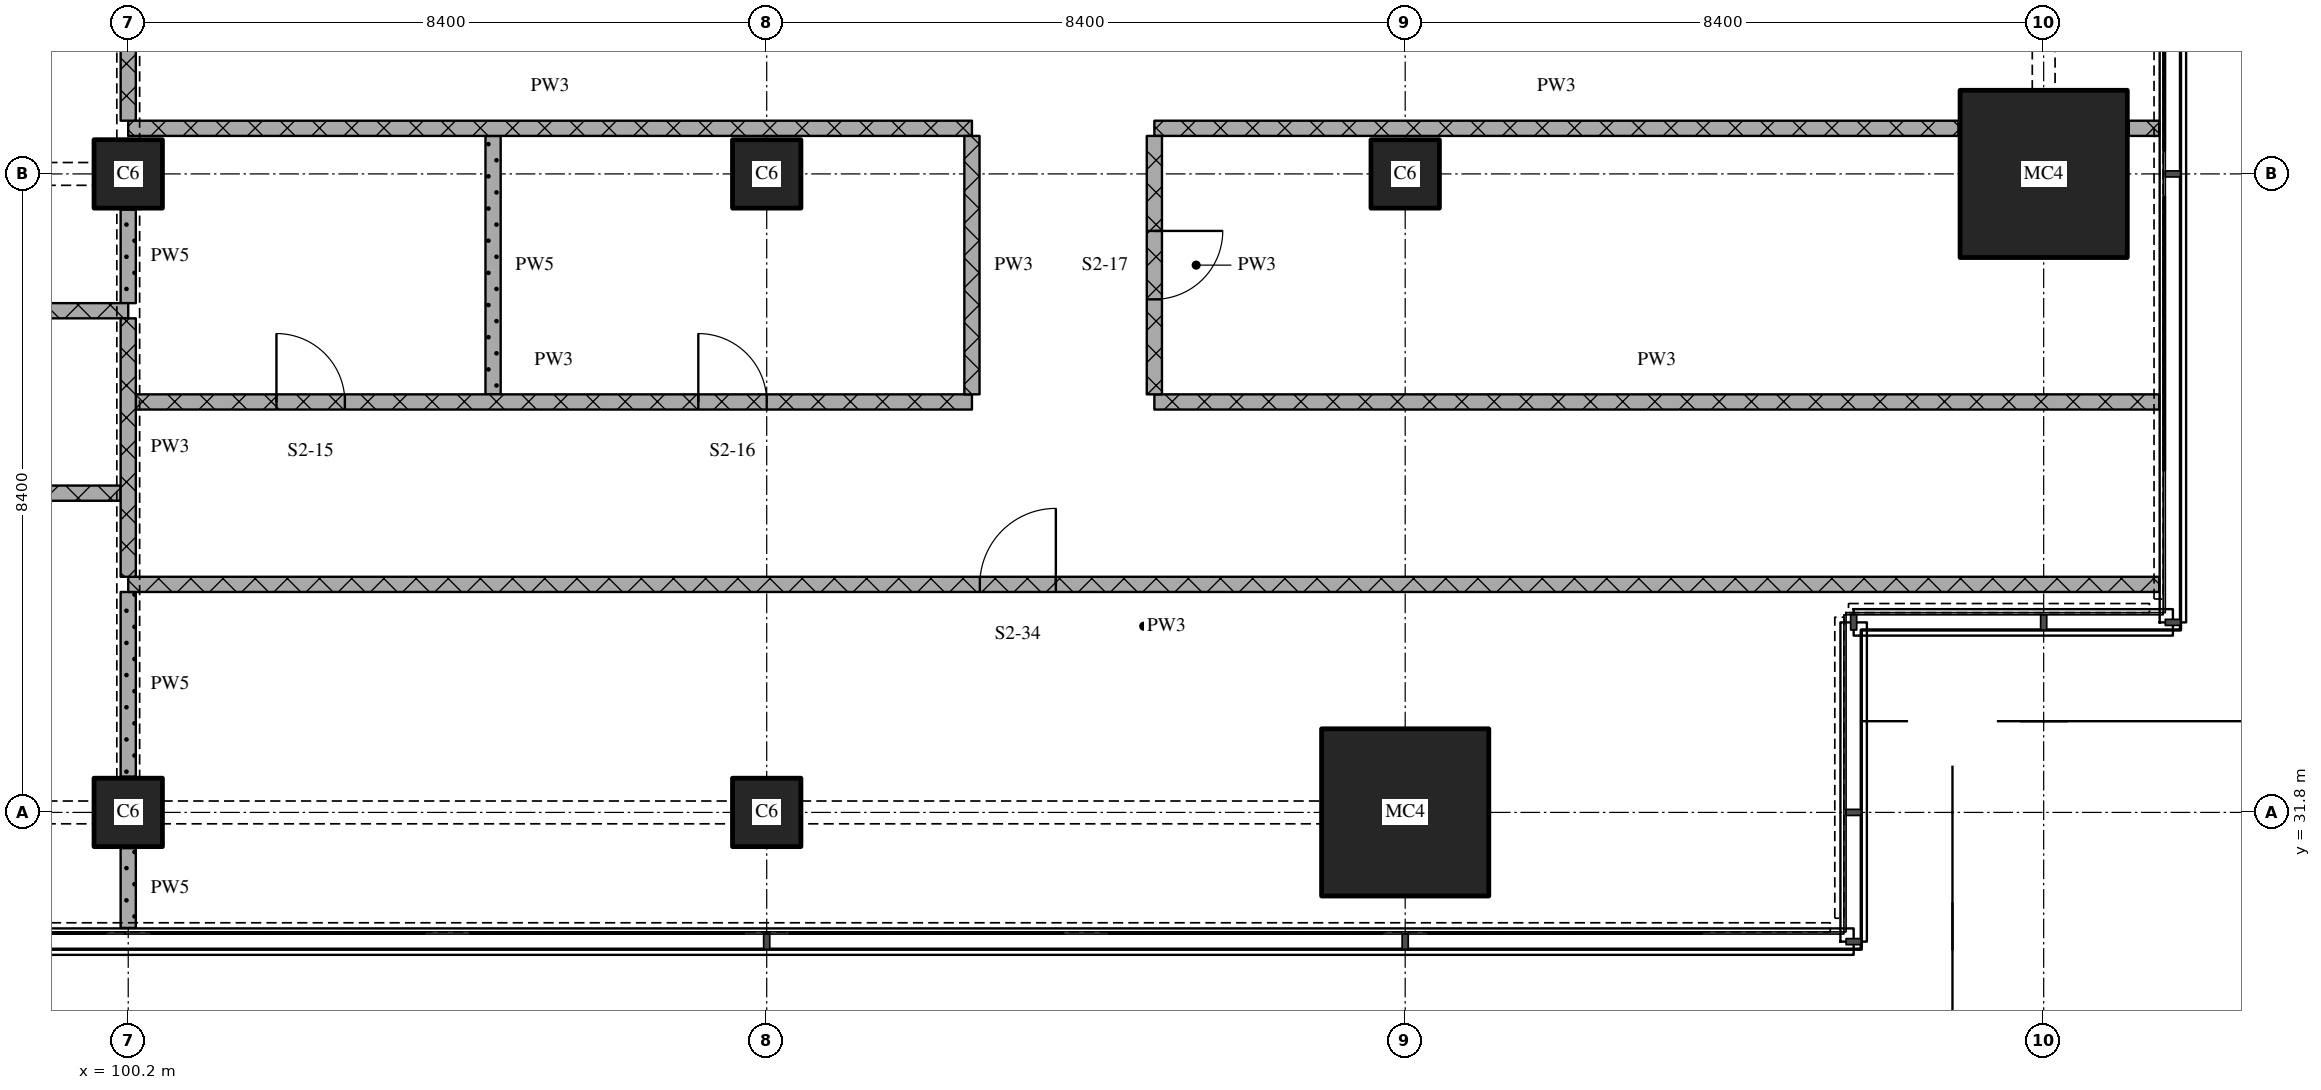
"""IFC4 building model, lengths in metres.
Left out: names, types, materials, properties, quantities, classifications, styles, units other than length and angle.
Written with IfcOpenShell. Run it as: python <this file> out.ifc"""

import sys

from ifc_helpers import new_model, si_unit, direction, frame, frame_2d, origin, origin_2d, place, context, subcontext, project, spatial, rectangle, extrude, element, fill, save


model = new_model("IFC4")
c1 = context("Model", 3, precision=1e-05, world=origin(), true_north=direction((0.0, 1.0)))
c2 = subcontext(c1, "Body", "Model", "MODEL_VIEW")
j1 = project(units=[si_unit("LENGTHUNIT", "METRE"), si_unit("PLANEANGLEUNIT", "RADIAN")], contexts=[c1])
p1 = place(None, origin())
s1 = spatial("IfcSite", under=j1, at=p1, CompositionType="ELEMENT")
p2 = place(p1, origin())
s2 = spatial("IfcBuilding", under=s1, at=p2, CompositionType="ELEMENT")
p3 = place(p2, frame((0.0, 0.0, 23.7)))
s3 = spatial("IfcBuildingStorey", under=s2, at=p3, CompositionType="ELEMENT", Elevation=23.7)
for number, where, z_axis, x_axis in (
    (1, (100.2, 31.8, 0.0), (0.0, 0.0, 1.0), (1.0, 0.0, 0.0)),
    (2, (100.2, 40.2, 0.0), (0.0, 0.0, 1.0), (1.0, 0.0, 0.0)),
    (3, (108.6, 31.8, 0.0), (0.0, 0.0, 1.0), (1.0, 0.0, 0.0)),
    (4, (108.6, 40.2, 0.0), (0.0, 0.0, 1.0), (1.0, 0.0, 0.0)),
):
    element("IfcColumn", number, at=place(p3, frame(where, z_axis=z_axis, x_axis=x_axis)), inside=s3, PredefinedType="COLUMN", context=c2, shape_type="SweptSolid", body=[
        extrude(rectangle(XDim=0.9, YDim=0.9, at=origin_2d()), origin(), (0.0, 0.0, 1.0), 4.5),
    ])
p4 = place(p3, frame((117.0, 31.8, 0.0), z_axis=(0.0, 0.0, 1.0), x_axis=(1.0, 0.0, 0.0)))
e5 = element("IfcColumn", 5, at=p4, inside=s3, PredefinedType="COLUMN", context=c2, shape_type="SweptSolid", body=[
    extrude(rectangle(XDim=2.2, YDim=2.2, at=origin_2d()), origin(), (0.0, 0.0, 1.0), 4.5),
])
p5 = place(p3, frame((117.0, 40.2, 0.0), z_axis=(0.0, 0.0, 1.0), x_axis=(1.0, 0.0, 0.0)))
e6 = element("IfcColumn", 6, at=p5, inside=s3, PredefinedType="COLUMN", context=c2, shape_type="SweptSolid", body=[
    extrude(rectangle(XDim=0.9, YDim=0.9, at=origin_2d()), origin(), (0.0, 0.0, 1.0), 4.5),
])
p6 = place(p3, frame((125.4, 40.2, 0.0), z_axis=(0.0, 0.0, 1.0), x_axis=(1.0, 0.0, 0.0)))
e7 = element("IfcColumn", 7, at=p6, inside=s3, PredefinedType="COLUMN", context=c2, shape_type="SweptSolid", body=[
    extrude(rectangle(XDim=2.2, YDim=2.2, at=origin_2d()), origin(), (0.0, 0.0, 1.0), 4.5),
])
p7 = place(p3, frame((126.92, 34.8, 0.0), z_axis=(0.0, 0.0, 1.0), x_axis=(-1.0, 0.0, 0.0)))
e8 = element("IfcWall", 8, at=p7, inside=s3, PredefinedType="PARTITIONING", context=c2, shape_type="SweptSolid", body=[
    extrude(rectangle(XDim=26.72, YDim=0.2, at=frame_2d((13.36, 0.0))), origin(), (0.0, 0.0, 1.0), 4.2),
])
p8 = place(p7, frame((14.516, 0.0, 0.0)))
e9 = element("IfcOpeningElement", 9, at=p8, cuts=e8, PredefinedType="OPENING", context=c2, shape_type="SweptSolid", body=[
    extrude(rectangle(XDim=1.0, YDim=2.1, at=frame_2d((0.5, 1.05))), frame((0.0, 0.11, 0.0), z_axis=(0.0, -1.0, 0.0), x_axis=(1.0, 0.0, 0.0)), (0.0, 0.0, 1.0), 0.22),
])
p9 = place(p3, frame((100.1, 36.0, 0.0), z_axis=(0.0, 0.0, 1.0), x_axis=(-1.0, 0.0, 0.0)))
e10 = element("IfcWall", 10, at=p9, inside=s3, PredefinedType="PARTITIONING", context=c2, shape_type="SweptSolid", body=[
    extrude(rectangle(XDim=25.0, YDim=0.2, at=frame_2d((12.5, 0.0))), origin(), (0.0, 0.0, 1.0), 4.2),
])
p10 = place(p9, frame((12.0, 0.0, 0.0)))
e11 = element("IfcOpeningElement", 11, at=p10, cuts=e10, PredefinedType="OPENING", context=c2, shape_type="SweptSolid", body=[
    extrude(rectangle(XDim=1.0, YDim=2.1, at=frame_2d((0.5, 1.05))), frame((0.0, 0.11, 0.0), z_axis=(0.0, -1.0, 0.0), x_axis=(1.0, 0.0, 0.0)), (0.0, 0.0, 1.0), 0.22),
])
p11 = place(p3, frame((100.3, 37.2, 0.0), z_axis=(0.0, 0.0, 1.0), x_axis=(1.0, 0.0, 0.0)))
e12 = element("IfcWall", 12, at=p11, inside=s3, PredefinedType="PARTITIONING", context=c2, shape_type="SweptSolid", body=[
    extrude(rectangle(XDim=11.0, YDim=0.2, at=frame_2d((5.5, 0.0))), origin(), (0.0, 0.0, 1.0), 4.2),
])
p12 = place(p11, frame((1.85, 0.0, 0.0)))
e13 = element("IfcOpeningElement", 13, at=p12, cuts=e12, PredefinedType="OPENING", context=c2, shape_type="SweptSolid", body=[
    extrude(rectangle(XDim=0.9, YDim=2.1, at=frame_2d((0.45, 1.05))), frame((0.0, 0.11, 0.0), z_axis=(0.0, -1.0, 0.0), x_axis=(1.0, 0.0, 0.0)), (0.0, 0.0, 1.0), 0.22),
])
p13 = place(p11, frame((7.4, 0.0, 0.0)))
e14 = element("IfcOpeningElement", 14, at=p13, cuts=e12, PredefinedType="OPENING", context=c2, shape_type="SweptSolid", body=[
    extrude(rectangle(XDim=0.9, YDim=2.1, at=frame_2d((0.45, 1.05))), frame((0.0, 0.11, 0.0), z_axis=(0.0, -1.0, 0.0), x_axis=(1.0, 0.0, 0.0)), (0.0, 0.0, 1.0), 0.22),
])
p14 = place(p3, frame((113.7, 37.2, 0.0), z_axis=(0.0, 0.0, 1.0), x_axis=(1.0, 0.0, 0.0)))
e15 = element("IfcWall", 15, at=p14, inside=s3, PredefinedType="PARTITIONING", context=c2, shape_type="SweptSolid", body=[
    extrude(rectangle(XDim=13.22, YDim=0.2, at=frame_2d((6.61, 0.0))), origin(), (0.0, 0.0, 1.0), 4.2),
])
p15 = place(p3, frame((88.8, 38.4, 0.0), z_axis=(0.0, 0.0, 1.0), x_axis=(1.0, 0.0, 0.0)))
e16 = element("IfcWall", 16, at=p15, inside=s3, PredefinedType="PARTITIONING", context=c2, shape_type="SweptSolid", body=[
    extrude(rectangle(XDim=11.4, YDim=0.2, at=frame_2d((5.7, 0.0))), origin(), (0.0, 0.0, 1.0), 4.2),
])
p16 = place(p15, frame((4.95, 0.0, 0.0)))
e17 = element("IfcOpeningElement", 17, at=p16, cuts=e16, PredefinedType="OPENING", context=c2, shape_type="SweptSolid", body=[
    extrude(rectangle(XDim=0.9, YDim=2.1, at=frame_2d((0.45, 1.05))), frame((0.0, 0.11, 0.0), z_axis=(0.0, -1.0, 0.0), x_axis=(1.0, 0.0, 0.0)), (0.0, 0.0, 1.0), 0.22),
])
p17 = place(p15, frame((9.15, 0.0, 0.0)))
e18 = element("IfcOpeningElement", 18, at=p17, cuts=e16, PredefinedType="OPENING", context=c2, shape_type="SweptSolid", body=[
    extrude(rectangle(XDim=0.9, YDim=2.1, at=frame_2d((0.45, 1.05))), frame((0.0, 0.11, 0.0), z_axis=(0.0, -1.0, 0.0), x_axis=(1.0, 0.0, 0.0)), (0.0, 0.0, 1.0), 0.22),
])
p18 = place(p3, frame((100.2, 40.8, 0.0), z_axis=(0.0, 0.0, 1.0), x_axis=(1.0, 0.0, 0.0)))
e19 = element("IfcWall", 19, at=p18, inside=s3, PredefinedType="PARTITIONING", context=c2, shape_type="SweptSolid", body=[
    extrude(rectangle(XDim=11.1, YDim=0.2, at=frame_2d((5.55, 0.0))), origin(), (0.0, 0.0, 1.0), 4.2),
])
p19 = place(p3, frame((113.7, 40.8, 0.0), z_axis=(0.0, 0.0, 1.0), x_axis=(1.0, 0.0, 0.0)))
e20 = element("IfcWall", 20, at=p19, inside=s3, PredefinedType="PARTITIONING", context=c2, shape_type="SweptSolid", body=[
    extrude(rectangle(XDim=10.58, YDim=0.2, at=frame_2d((5.29, 0.0))), origin(), (0.0, 0.0, 1.0), 4.2),
])
p20 = place(p3, frame((126.52, 40.8, 0.0), z_axis=(0.0, 0.0, 1.0), x_axis=(1.0, 0.0, 0.0)))
e21 = element("IfcWall", 21, at=p20, inside=s3, PredefinedType="PARTITIONING", context=c2, shape_type="SweptSolid", body=[
    extrude(rectangle(XDim=0.4, YDim=0.2, at=frame_2d((0.2, 0.0))), origin(), (0.0, 0.0, 1.0), 4.2),
])
p21 = place(p3, frame((100.2, 38.3, 0.0), z_axis=(0.0, 0.0, 1.0), x_axis=(0.0, -1.0, 0.0)))
e22 = element("IfcWall", 22, at=p21, inside=s3, PredefinedType="PARTITIONING", context=c2, shape_type="SweptSolid", body=[
    extrude(rectangle(XDim=3.4, YDim=0.2, at=frame_2d((1.7, 0.0))), origin(), (0.0, 0.0, 1.0), 3.7),
])
p22 = place(p3, frame((100.2, 43.1, 0.0), z_axis=(0.0, 0.0, 1.0), x_axis=(0.0, -1.0, 0.0)))
e23 = element("IfcWall", 23, at=p22, inside=s3, PredefinedType="PARTITIONING", context=c2, shape_type="SweptSolid", body=[
    extrude(rectangle(XDim=2.2, YDim=0.2, at=frame_2d((1.1, 0.0))), origin(), (0.0, 0.0, 1.0), 3.3),
])
p23 = place(p3, frame((100.2, 31.33, 0.0), z_axis=(0.0, 0.0, 1.0), x_axis=(0.0, -1.0, 0.0)))
e24 = element("IfcWall", 24, at=p23, inside=s3, PredefinedType="PARTITIONING", context=c2, shape_type="SweptSolid", body=[
    extrude(rectangle(XDim=1.05, YDim=0.2, at=frame_2d((0.525, 0.0))), origin(), (0.0, 0.0, 1.0), 4.2),
])
p24 = place(p3, frame((100.2, 34.7, 0.0), z_axis=(0.0, 0.0, 1.0), x_axis=(0.0, -1.0, 0.0)))
e25 = element("IfcWall", 25, at=p24, inside=s3, PredefinedType="PARTITIONING", context=c2, shape_type="SweptSolid", body=[
    extrude(rectangle(XDim=2.43, YDim=0.2, at=frame_2d((1.215, 0.0))), origin(), (0.0, 0.0, 1.0), 3.7),
])
p25 = place(p3, frame((100.2, 39.73, 0.0), z_axis=(0.0, 0.0, 1.0), x_axis=(0.0, -1.0, 0.0)))
e26 = element("IfcWall", 26, at=p25, inside=s3, PredefinedType="PARTITIONING", context=c2, shape_type="SweptSolid", body=[
    extrude(rectangle(XDim=1.23, YDim=0.2, at=frame_2d((0.615, 0.0))), origin(), (0.0, 0.0, 1.0), 3.7),
])
for number, where, z_axis, x_axis in (
    (27, (105.0, 40.7, 0.0), (0.0, 0.0, 1.0), (0.0, -1.0, 0.0)),
    (28, (111.3, 40.7, 0.0), (0.0, 0.0, 1.0), (0.0, -1.0, 0.0)),
):
    element("IfcWall", number, at=place(p3, frame(where, z_axis=z_axis, x_axis=x_axis)), inside=s3, PredefinedType="PARTITIONING", context=c2, shape_type="SweptSolid", body=[
        extrude(rectangle(XDim=3.4, YDim=0.2, at=frame_2d((1.7, 0.0))), origin(), (0.0, 0.0, 1.0), 4.2),
    ])
p26 = place(p3, frame((113.7, 40.7, 0.0), z_axis=(0.0, 0.0, 1.0), x_axis=(0.0, -1.0, 0.0)))
e29 = element("IfcWall", 29, at=p26, inside=s3, PredefinedType="PARTITIONING", context=c2, shape_type="SweptSolid", body=[
    extrude(rectangle(XDim=3.4, YDim=0.2, at=frame_2d((1.7, 0.0))), origin(), (0.0, 0.0, 1.0), 4.2),
])
p27 = place(p26, frame((1.25, 0.0, 0.0)))
e30 = element("IfcOpeningElement", 30, at=p27, cuts=e29, PredefinedType="OPENING", context=c2, shape_type="SweptSolid", body=[
    extrude(rectangle(XDim=0.9, YDim=2.1, at=frame_2d((0.45, 1.05))), frame((0.0, 0.11, 0.0), z_axis=(0.0, -1.0, 0.0), x_axis=(1.0, 0.0, 0.0)), (0.0, 0.0, 1.0), 0.22),
])
p28 = place(p8, origin())
e31 = element("IfcDoor", 31, at=p28, inside=s3, OperationType="SINGLE_SWING_RIGHT", PredefinedType="DOOR", context=c2, shape_type="SweptSolid", body=[
    extrude(rectangle(XDim=1.0, YDim=2.1, at=frame_2d((0.5, 1.05))), frame((0.0, 0.025, 0.0), z_axis=(0.0, -1.0, 0.0), x_axis=(1.0, 0.0, 0.0)), (0.0, 0.0, 1.0), 0.05),
])
fill(e9, e31)
p29 = place(p12, origin())
e32 = element("IfcDoor", 32, at=p29, inside=s3, OperationType="SINGLE_SWING_LEFT", PredefinedType="DOOR", context=c2, shape_type="SweptSolid", body=[
    extrude(rectangle(XDim=0.9, YDim=2.1, at=frame_2d((0.45, 1.05))), frame((0.0, 0.025, 0.0), z_axis=(0.0, -1.0, 0.0), x_axis=(1.0, 0.0, 0.0)), (0.0, 0.0, 1.0), 0.05),
])
fill(e13, e32)
p30 = place(p13, origin())
e33 = element("IfcDoor", 33, at=p30, inside=s3, OperationType="SINGLE_SWING_LEFT", PredefinedType="DOOR", context=c2, shape_type="SweptSolid", body=[
    extrude(rectangle(XDim=0.9, YDim=2.1, at=frame_2d((0.45, 1.05))), frame((0.0, 0.025, 0.0), z_axis=(0.0, -1.0, 0.0), x_axis=(1.0, 0.0, 0.0)), (0.0, 0.0, 1.0), 0.05),
])
fill(e14, e33)
p31 = place(p27, origin())
e34 = element("IfcDoor", 34, at=p31, inside=s3, OperationType="SINGLE_SWING_LEFT", PredefinedType="DOOR", context=c2, shape_type="SweptSolid", body=[
    extrude(rectangle(XDim=0.9, YDim=2.1, at=frame_2d((0.45, 1.05))), frame((0.0, 0.025, 0.0), z_axis=(0.0, -1.0, 0.0), x_axis=(1.0, 0.0, 0.0)), (0.0, 0.0, 1.0), 0.05),
])
fill(e30, e34)
save(model, sys.argv[1])
